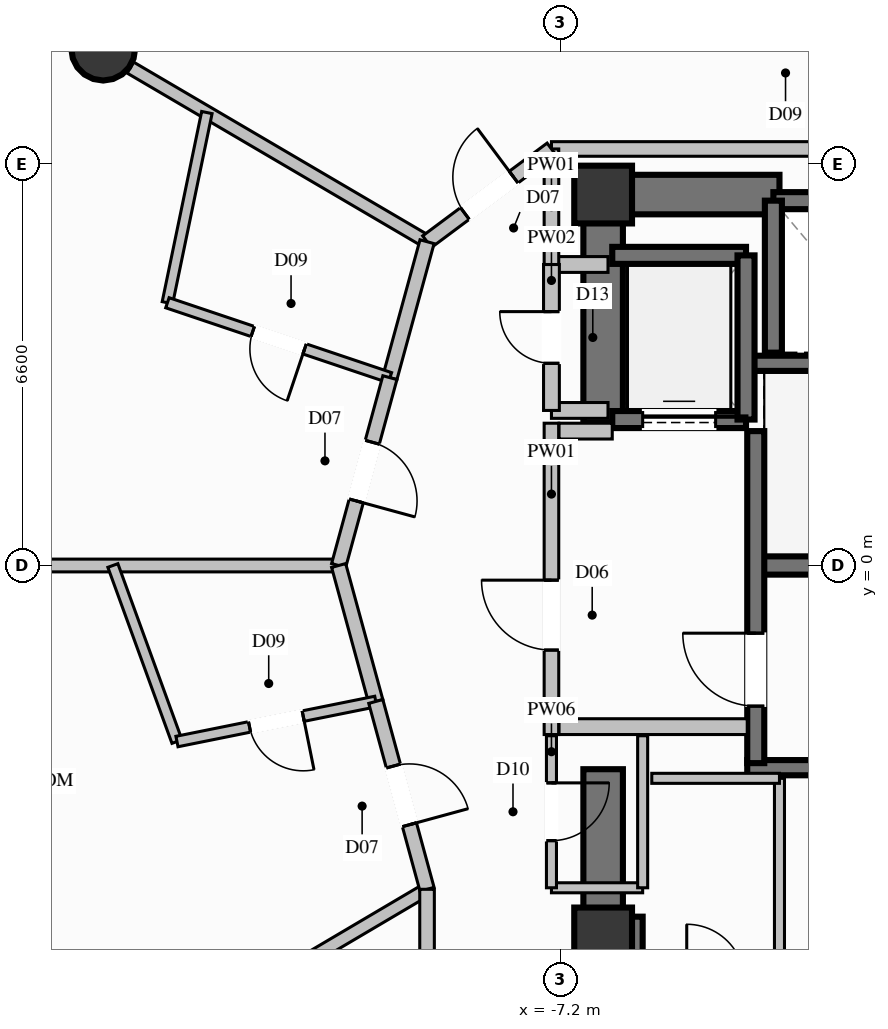
"""IFC4 building model, lengths in metres.
Left out: names, types, materials, properties, quantities, classifications, styles, units other than length and angle.
Written with IfcOpenShell. Run it as: python <this file> out.ifc"""

import sys

from ifc_helpers import new_model, si_unit, direction, frame, frame_2d, origin, origin_2d, place, context, subcontext, project, spatial, rectangle, circle, extrude, element, fill, save


model = new_model("IFC4")
c1 = context("Model", 3, precision=1e-05, world=origin(), true_north=direction((0.0, 1.0)))
c2 = subcontext(c1, "Body", "Model", "MODEL_VIEW")
j1 = project(units=[si_unit("LENGTHUNIT", "METRE"), si_unit("PLANEANGLEUNIT", "RADIAN")], contexts=[c1])
p1 = place(None, origin())
s1 = spatial("IfcSite", under=j1, at=p1, CompositionType="ELEMENT")
p2 = place(p1, origin())
s2 = spatial("IfcBuilding", under=s1, at=p2, CompositionType="ELEMENT")
p3 = place(p2, frame((0.0, 0.0, 106.2)))
s3 = spatial("IfcBuildingStorey", under=s2, at=p3, CompositionType="ELEMENT", Elevation=106.2)
for number, where, z_axis, x_axis in (
    (1, (-6.5, -6.1, 0.0), (0.0, 0.0, 1.0), (1.0, 0.0, 0.0)),
    (2, (-6.5, 6.1, 0.0), (0.0, 0.0, 1.0), (1.0, 0.0, 0.0)),
):
    element("IfcColumn", number, at=place(p3, frame(where, z_axis=z_axis, x_axis=x_axis)), inside=s3, PredefinedType="COLUMN", context=c2, shape_type="SweptSolid", body=[
        extrude(rectangle(XDim=0.95, YDim=0.95, at=origin_2d()), origin(), (0.0, 0.0, 1.0), 3.6),
    ])
p4 = place(p3, frame((-3.99, 0.0, 0.0), z_axis=(0.0, 0.0, 1.0), x_axis=(1.0, 0.0, 0.0)))
e3 = element("IfcWall", 3, at=p4, inside=s3, PredefinedType="SHEAR", context=c2, shape_type="SweptSolid", body=[
    extrude(rectangle(XDim=7.98, YDim=0.3, at=frame_2d((3.99, 0.0))), origin(), (0.0, 0.0, 1.0), 3.6),
])
for number, where, z_axis, x_axis in (
    (4, (-4.13, -3.325, 0.0), (0.0, 0.0, 1.0), (1.0, 0.0, 0.0)),
    (5, (-4.13, 3.325, 0.0), (0.0, 0.0, 1.0), (1.0, 0.0, 0.0)),
):
    element("IfcWall", number, at=place(p3, frame(where, z_axis=z_axis, x_axis=x_axis)), inside=s3, PredefinedType="SOLIDWALL", context=c2, shape_type="SweptSolid", body=[
        extrude(rectangle(XDim=8.26, YDim=0.25, at=frame_2d((4.13, 0.0))), origin(), (0.0, 0.0, 1.0), 3.6),
    ])
p5 = place(p3, frame((-6.175, -6.1, 0.0), z_axis=(0.0, 0.0, 1.0), x_axis=(1.0, 0.0, 0.0)))
e6 = element("IfcWall", 6, at=p5, inside=s3, PredefinedType="SHEAR", context=c2, shape_type="SweptSolid", body=[
    extrude(rectangle(XDim=0.325, YDim=0.65, at=frame_2d((0.163, 0.0))), origin(), (0.0, 0.0, 1.0), 3.6),
])
p6 = place(p3, frame((-6.175, 6.1, 0.0), z_axis=(0.0, 0.0, 1.0), x_axis=(1.0, 0.0, 0.0)))
e7 = element("IfcWall", 7, at=p6, inside=s3, PredefinedType="SHEAR", context=c2, shape_type="SweptSolid", body=[
    extrude(rectangle(XDim=2.575, YDim=0.65, at=frame_2d((1.288, 0.0))), origin(), (0.0, 0.0, 1.0), 3.6),
])
p7 = place(p3, frame((-6.5, 2.35, 0.0), z_axis=(0.0, 0.0, 1.0), x_axis=(0.0, 1.0, 0.0)))
e8 = element("IfcWall", 8, at=p7, inside=s3, PredefinedType="SHEAR", context=c2, shape_type="SweptSolid", body=[
    extrude(rectangle(XDim=4.075, YDim=0.65, at=frame_2d((2.038, 0.0))), origin(), (0.0, 0.0, 1.0), 3.6),
])
p8 = place(p3, frame((-6.5, -6.425, 0.0), z_axis=(0.0, 0.0, 1.0), x_axis=(0.0, 1.0, 0.0)))
e9 = element("IfcWall", 9, at=p8, inside=s3, PredefinedType="SHEAR", context=c2, shape_type="SweptSolid", body=[
    extrude(rectangle(XDim=3.075, YDim=0.65, at=frame_2d((1.538, 0.0))), origin(), (0.0, 0.0, 1.0), 3.6),
])
p9 = place(p3, frame((-14.722, 8.5, 0.0), z_axis=(0.0, 0.0, 1.0), x_axis=(1.0, 0.0, 0.0)))
e10 = element("IfcColumn", 10, at=p9, inside=s3, PredefinedType="COLUMN", context=c2, shape_type="SweptSolid", body=[
    extrude(circle(Radius=0.525, at=origin_2d()), origin(), (0.0, 0.0, 1.0), 3.6),
])
p10 = place(p3, frame((-1.6, 6.0, 0.0), z_axis=(0.0, 0.0, 1.0), x_axis=(-1.0, 0.0, 0.0)))
e11 = element("IfcWall", 11, at=p10, inside=s3, PredefinedType="SOLIDWALL", context=c2, shape_type="SweptSolid", body=[
    extrude(rectangle(XDim=2.1, YDim=0.28, at=frame_2d((1.05, 0.0))), origin(), (0.0, 0.0, 1.0), 3.35),
])
p11 = place(p3, frame((-3.7, 6.0, 0.0), z_axis=(0.0, 0.0, 1.0), x_axis=(0.0, -1.0, 0.0)))
e12 = element("IfcWall", 12, at=p11, inside=s3, PredefinedType="SOLIDWALL", context=c2, shape_type="SweptSolid", body=[
    extrude(rectangle(XDim=2.5, YDim=0.28, at=frame_2d((1.25, 0.0))), origin(), (0.0, 0.0, 1.0), 3.35),
])
p12 = place(p3, frame((-6.35, 2.4, 0.0), z_axis=(0.0, 0.0, 1.0), x_axis=(1.0, 0.0, 0.0)))
e13 = element("IfcWall", 13, at=p12, inside=s3, PredefinedType="SOLIDWALL", context=c2, shape_type="SweptSolid", body=[
    extrude(rectangle(XDim=2.2, YDim=0.28, at=frame_2d((1.1, 0.0))), origin(), (0.0, 0.0, 1.0), 3.35),
])
p13 = place(p12, frame((0.5, 0.0, 0.0)))
e14 = element("IfcOpeningElement", 14, at=p13, cuts=e13, PredefinedType="OPENING", context=c2, shape_type="SweptSolid", body=[
    extrude(rectangle(XDim=1.2, YDim=2.2, at=frame_2d((0.6, 1.1))), frame((0.0, 0.15, 0.0), z_axis=(0.0, -1.0, 0.0), x_axis=(1.0, 0.0, 0.0)), (0.0, 0.0, 1.0), 0.3),
])
p14 = place(p3, frame((-4.15, 5.1, 0.0), z_axis=(0.0, 0.0, 1.0), x_axis=(-1.0, 0.0, 0.0)))
e15 = element("IfcWall", 15, at=p14, inside=s3, PredefinedType="SOLIDWALL", context=c2, shape_type="SweptSolid", body=[
    extrude(rectangle(XDim=2.2, YDim=0.28, at=frame_2d((1.1, 0.0))), origin(), (0.0, 0.0, 1.0), 3.35),
])
p15 = place(p3, frame((-4.15, 2.4, 0.0), z_axis=(0.0, 0.0, 1.0), x_axis=(0.0, 1.0, 0.0)))
e16 = element("IfcWall", 16, at=p15, inside=s3, PredefinedType="SOLIDWALL", context=c2, shape_type="SweptSolid", body=[
    extrude(rectangle(XDim=2.7, YDim=0.28, at=frame_2d((1.35, 0.0))), origin(), (0.0, 0.0, 1.0), 3.35),
])
p16 = place(p3, frame((-3.99, -3.25, 0.0), z_axis=(0.0, 0.0, 1.0), x_axis=(0.0, 1.0, 0.0)))
e17 = element("IfcWall", 17, at=p16, inside=s3, PredefinedType="SOLIDWALL", context=c2, shape_type="SweptSolid", body=[
    extrude(rectangle(XDim=5.46, YDim=0.28, at=frame_2d((2.73, 0.0))), origin(), (0.0, 0.0, 1.0), 3.35),
])
p17 = place(p16, frame((0.937, 0.0, 0.0)))
e18 = element("IfcOpeningElement", 18, at=p17, cuts=e17, PredefinedType="OPENING", context=c2, shape_type="SweptSolid", body=[
    extrude(rectangle(XDim=1.2, YDim=2.2, at=frame_2d((0.6, 1.1))), frame((0.0, 0.15, 0.0), z_axis=(0.0, -1.0, 0.0), x_axis=(1.0, 0.0, 0.0)), (0.0, 0.0, 1.0), 0.3),
])
p18 = place(p3, frame((-7.35, -2.78, 0.0), z_axis=(0.0, 0.0, 1.0), x_axis=(0.0, 1.0, 0.0)))
e19 = element("IfcWall", 19, at=p18, inside=s3, PredefinedType="PARTITIONING", context=c2, shape_type="SweptSolid", body=[
    extrude(rectangle(XDim=5.12, YDim=0.24, at=frame_2d((2.56, 0.0))), origin(), (0.0, 0.0, 1.0), 2.435),
])
p19 = place(p18, frame((1.389, 0.0, 0.0)))
e20 = element("IfcOpeningElement", 20, at=p19, cuts=e19, PredefinedType="OPENING", context=c2, shape_type="SweptSolid", body=[
    extrude(rectangle(XDim=1.15, YDim=2.2, at=frame_2d((0.575, 1.1))), frame((0.0, 0.13, 0.0), z_axis=(0.0, -1.0, 0.0), x_axis=(1.0, 0.0, 0.0)), (0.0, 0.0, 1.0), 0.26),
])
p20 = place(p3, frame((-7.225, -2.65, 0.0), z_axis=(0.0, 0.0, 1.0), x_axis=(1.0, 0.0, 0.0)))
e21 = element("IfcWall", 21, at=p20, inside=s3, PredefinedType="PARTITIONING", context=c2, shape_type="SweptSolid", body=[
    extrude(rectangle(XDim=3.095, YDim=0.26, at=frame_2d((1.548, 0.0))), origin(), (0.0, 0.0, 1.0), 3.35),
])
p21 = place(p3, frame((-7.225, 2.21, 0.0), z_axis=(0.0, 0.0, 1.0), x_axis=(1.0, 0.0, 0.0)))
e22 = element("IfcWall", 22, at=p21, inside=s3, PredefinedType="PARTITIONING", context=c2, shape_type="SweptSolid", body=[
    extrude(rectangle(XDim=0.875, YDim=0.26, at=frame_2d((0.438, 0.0))), origin(), (0.0, 0.0, 1.0), 3.35),
])
for number, where, z_axis, x_axis in (
    (23, (-7.35, 4.95, 0.0), (0.0, 0.0, 1.0), (1.0, 0.0, 0.0)),
    (24, (-7.35, 2.55, 0.0), (0.0, 0.0, 1.0), (1.0, 0.0, 0.0)),
):
    element("IfcWall", number, at=place(p3, frame(where, z_axis=z_axis, x_axis=x_axis)), inside=s3, PredefinedType="PARTITIONING", context=c2, shape_type="SweptSolid", body=[
        extrude(rectangle(XDim=0.93, YDim=0.26, at=frame_2d((0.465, 0.0))), origin(), (0.0, 0.0, 1.0), 3.35),
    ])
p22 = place(p3, frame((-7.35, 2.55, 0.0), z_axis=(0.0, 0.0, 1.0), x_axis=(0.0, 1.0, 0.0)))
e25 = element("IfcWall", 25, at=p22, inside=s3, PredefinedType="PARTITIONING", context=c2, shape_type="SweptSolid", body=[
    extrude(rectangle(XDim=2.4, YDim=0.26, at=frame_2d((1.2, 0.0))), origin(), (0.0, 0.0, 1.0), 2.435),
])
p23 = place(p22, frame((0.775, 0.0, 0.0)))
e26 = element("IfcOpeningElement", 26, at=p23, cuts=e25, PredefinedType="OPENING", context=c2, shape_type="SweptSolid", body=[
    extrude(rectangle(XDim=0.85, YDim=2.05, at=frame_2d((0.425, 1.025))), frame((0.0, 0.14, 0.0), z_axis=(0.0, -1.0, 0.0), x_axis=(1.0, 0.0, 0.0)), (0.0, 0.0, 1.0), 0.28),
])
p24 = place(p3, frame((-7.35, 6.85, 0.0), z_axis=(0.0, 0.0, 1.0), x_axis=(1.0, 0.0, 0.0)))
e27 = element("IfcWall", 27, at=p24, inside=s3, PredefinedType="PARTITIONING", context=c2, shape_type="SweptSolid", body=[
    extrude(rectangle(XDim=14.7, YDim=0.24, at=frame_2d((7.35, 0.0))), origin(), (0.0, 0.0, 1.0), 2.435),
])
p25 = place(p3, frame((-7.35, 4.95, 0.0), z_axis=(0.0, 0.0, 1.0), x_axis=(0.0, 1.0, 0.0)))
e28 = element("IfcWall", 28, at=p25, inside=s3, PredefinedType="PARTITIONING", context=c2, shape_type="SweptSolid", body=[
    extrude(rectangle(XDim=1.9, YDim=0.24, at=frame_2d((0.95, 0.0))), origin(), (0.0, 0.0, 1.0), 2.435),
])
p26 = place(p3, frame((-7.35, -5.3, 0.0), z_axis=(0.0, 0.0, 1.0), x_axis=(1.0, 0.0, 0.0)))
e29 = element("IfcWall", 29, at=p26, inside=s3, PredefinedType="PARTITIONING", context=c2, shape_type="SweptSolid", body=[
    extrude(rectangle(XDim=1.5, YDim=0.165, at=frame_2d((0.75, 0.0))), origin(), (0.0, 0.0, 1.0), 2.435),
])
p27 = place(p3, frame((-5.85, -5.3, 0.0), z_axis=(0.0, 0.0, 1.0), x_axis=(0.0, 1.0, 0.0)))
e30 = element("IfcWall", 30, at=p27, inside=s3, PredefinedType="PARTITIONING", context=c2, shape_type="SweptSolid", body=[
    extrude(rectangle(XDim=2.5, YDim=0.165, at=frame_2d((1.25, 0.0))), origin(), (0.0, 0.0, 1.0), 2.435),
])
p28 = place(p3, frame((-7.35, -2.8, 0.0), z_axis=(0.0, 0.0, 1.0), x_axis=(0.0, -1.0, 0.0)))
e31 = element("IfcWall", 31, at=p28, inside=s3, PredefinedType="PARTITIONING", context=c2, shape_type="SweptSolid", body=[
    extrude(rectangle(XDim=2.5, YDim=0.165, at=frame_2d((1.25, 0.0))), origin(), (0.0, 0.0, 1.0), 3.35),
])
p29 = place(p28, frame((0.775, 0.0, 0.0)))
e32 = element("IfcOpeningElement", 32, at=p29, cuts=e31, PredefinedType="OPENING", context=c2, shape_type="SweptSolid", body=[
    extrude(rectangle(XDim=0.95, YDim=2.1, at=frame_2d((0.475, 1.05))), frame((0.0, 0.093, 0.0), z_axis=(0.0, -1.0, 0.0), x_axis=(1.0, 0.0, 0.0)), (0.0, 0.0, 1.0), 0.185),
])
p30 = place(p3, frame((-3.6, -6.85, 0.0), z_axis=(0.0, 0.0, 1.0), x_axis=(0.0, 1.0, 0.0)))
e33 = element("IfcWall", 33, at=p30, inside=s3, PredefinedType="PARTITIONING", context=c2, shape_type="SweptSolid", body=[
    extrude(rectangle(XDim=3.35, YDim=0.165, at=frame_2d((1.675, 0.0))), origin(), (0.0, 0.0, 1.0), 3.35),
])
p31 = place(p3, frame((-3.6, -3.5, 0.0), z_axis=(0.0, 0.0, 1.0), x_axis=(-1.0, 0.0, 0.0)))
e34 = element("IfcWall", 34, at=p31, inside=s3, PredefinedType="PARTITIONING", context=c2, shape_type="SweptSolid", body=[
    extrude(rectangle(XDim=2.1, YDim=0.165, at=frame_2d((1.05, 0.0))), origin(), (0.0, 0.0, 1.0), 3.35),
])
p32 = place(p3, frame((-9.396, 5.325, 0.0), z_axis=(0.0, 0.0, 1.0), x_axis=(-0.862467386777, 0.50611264235, 0.0)))
e35 = element("IfcWall", 35, at=p32, inside=s3, PredefinedType="PARTITIONING", context=c2, shape_type="SweptSolid", body=[
    extrude(rectangle(XDim=5.657, YDim=0.21, at=frame_2d((2.829, 0.0))), origin(), (0.0, 0.0, 1.0), 2.719),
])
p33 = place(p3, frame((-10.85, 0.0, 0.0), z_axis=(0.0, 0.0, 1.0), x_axis=(-1.0, 0.0, 0.0)))
e36 = element("IfcWall", 36, at=p33, inside=s3, PredefinedType="PARTITIONING", context=c2, shape_type="SweptSolid", body=[
    extrude(rectangle(XDim=5.605, YDim=0.21, at=frame_2d((2.802, 0.0))), origin(), (0.0, 0.0, 1.0), 3.35),
])
p34 = place(p3, frame((-9.396, -5.325, 0.0), z_axis=(0.0, 0.0, 1.0), x_axis=(-0.861187639937, -0.508287171607, 0.0)))
e37 = element("IfcWall", 37, at=p34, inside=s3, PredefinedType="PARTITIONING", context=c2, shape_type="SweptSolid", body=[
    extrude(rectangle(XDim=5.656, YDim=0.21, at=frame_2d((2.828, 0.0))), origin(), (0.0, 0.0, 1.0), 2.719),
])
p35 = place(p3, frame((-3.584, 9.865, 0.0), z_axis=(0.0, 0.0, 1.0), x_axis=(0.404626310395, -0.914482120621, 0.0)))
e38 = element("IfcWall", 38, at=p35, inside=s3, PredefinedType="PLUMBINGWALL", context=c2, shape_type="SweptSolid", body=[
    extrude(rectangle(XDim=3.297, YDim=0.175, at=frame_2d((1.648, 0.0))), origin(), (0.0, 0.0, 1.0), 3.35),
])
p36 = place(p35, frame((1.198, 0.0, 0.0)))
e39 = element("IfcOpeningElement", 39, at=p36, cuts=e38, PredefinedType="OPENING", context=c2, shape_type="SweptSolid", body=[
    extrude(rectangle(XDim=0.9, YDim=2.1, at=frame_2d((0.45, 1.05))), frame((0.0, 0.098, 0.0), z_axis=(0.0, -1.0, 0.0), x_axis=(1.0, 0.0, 0.0)), (0.0, 0.0, 1.0), 0.195),
])
p37 = place(p3, frame((-9.396, 5.325, 0.0), z_axis=(0.0, 0.0, 1.0), x_axis=(0.8017416961, 0.597670689205, 0.0)))
e40 = element("IfcWall", 40, at=p37, inside=s3, PredefinedType="PARTITIONING", context=c2, shape_type="SweptSolid", body=[
    extrude(rectangle(XDim=2.552, YDim=0.24, at=frame_2d((1.276, 0.0))), origin(), (0.0, 0.0, 1.0), 3.35),
])
p38 = place(p37, frame((0.776, 0.0, 0.0)))
e41 = element("IfcOpeningElement", 41, at=p38, cuts=e40, PredefinedType="OPENING", context=c2, shape_type="SweptSolid", body=[
    extrude(rectangle(XDim=1.0, YDim=2.2, at=frame_2d((0.5, 1.1))), frame((0.0, 0.13, 0.0), z_axis=(0.0, -1.0, 0.0), x_axis=(1.0, 0.0, 0.0)), (0.0, 0.0, 1.0), 0.26),
])
p39 = place(p3, frame((-9.396, 5.325, 0.0), z_axis=(0.0, 0.0, 1.0), x_axis=(-0.263643210908, -0.964620265878, 0.0)))
e42 = element("IfcWall", 42, at=p39, inside=s3, PredefinedType="PARTITIONING", context=c2, shape_type="SweptSolid", body=[
    extrude(rectangle(XDim=2.318, YDim=0.24, at=frame_2d((1.159, 0.0))), origin(), (0.0, 0.0, 1.0), 3.35),
])
p40 = place(p3, frame((-13.017, 7.449, 0.0), z_axis=(0.0, 0.0, 1.0), x_axis=(-0.203136275653, -0.979150475419, 0.0)))
e43 = element("IfcWall", 43, at=p40, inside=s3, PredefinedType="PLUMBINGWALL", context=c2, shape_type="SweptSolid", body=[
    extrude(rectangle(XDim=3.195, YDim=0.175, at=frame_2d((1.597, 0.0))), origin(), (0.0, 0.0, 1.0), 3.35),
])
p41 = place(p3, frame((-10.007, 3.089, 0.0), z_axis=(0.0, 0.0, 1.0), x_axis=(-0.947724103288, 0.319090933822, 0.0)))
e44 = element("IfcWall", 44, at=p41, inside=s3, PredefinedType="PLUMBINGWALL", context=c2, shape_type="SweptSolid", body=[
    extrude(rectangle(XDim=3.861, YDim=0.175, at=frame_2d((1.93, 0.0))), origin(), (0.0, 0.0, 1.0), 3.35),
])
p42 = place(p41, frame((1.48, 0.0, 0.0)))
e45 = element("IfcOpeningElement", 45, at=p42, cuts=e44, PredefinedType="OPENING", context=c2, shape_type="SweptSolid", body=[
    extrude(rectangle(XDim=0.9, YDim=2.1, at=frame_2d((0.45, 1.05))), frame((0.0, 0.098, 0.0), z_axis=(0.0, -1.0, 0.0), x_axis=(1.0, 0.0, 0.0)), (0.0, 0.0, 1.0), 0.195),
])
p43 = place(p3, frame((-10.007, 3.089, 0.0), z_axis=(0.0, 0.0, 1.0), x_axis=(-0.263272237376, -0.964721581093, 0.0)))
e46 = element("IfcWall", 46, at=p43, inside=s3, PredefinedType="PARTITIONING", context=c2, shape_type="SweptSolid", body=[
    extrude(rectangle(XDim=3.202, YDim=0.24, at=frame_2d((1.601, 0.0))), origin(), (0.0, 0.0, 1.0), 3.35),
])
p44 = place(p43, frame((1.101, 0.0, 0.0)))
e47 = element("IfcOpeningElement", 47, at=p44, cuts=e46, PredefinedType="OPENING", context=c2, shape_type="SweptSolid", body=[
    extrude(rectangle(XDim=1.0, YDim=2.2, at=frame_2d((0.5, 1.1))), frame((0.0, 0.13, 0.0), z_axis=(0.0, -1.0, 0.0), x_axis=(1.0, 0.0, 0.0)), (0.0, 0.0, 1.0), 0.26),
])
p45 = place(p3, frame((-10.85, 0.0, 0.0), z_axis=(0.0, 0.0, 1.0), x_axis=(0.263616426241, -0.964627586074, 0.0)))
e48 = element("IfcWall", 48, at=p45, inside=s3, PredefinedType="PARTITIONING", context=c2, shape_type="SweptSolid", body=[
    extrude(rectangle(XDim=2.318, YDim=0.24, at=frame_2d((1.159, 0.0))), origin(), (0.0, 0.0, 1.0), 3.35),
])
p46 = place(p3, frame((-14.563, 0.0, 0.0), z_axis=(0.0, 0.0, 1.0), x_axis=(0.342092982083, -0.939666106449, 0.0)))
e49 = element("IfcWall", 49, at=p46, inside=s3, PredefinedType="PLUMBINGWALL", context=c2, shape_type="SweptSolid", body=[
    extrude(rectangle(XDim=3.081, YDim=0.175, at=frame_2d((1.541, 0.0))), origin(), (0.0, 0.0, 1.0), 3.35),
])
p47 = place(p3, frame((-10.239, -2.236, 0.0), z_axis=(0.0, 0.0, 1.0), x_axis=(-0.980295333609, -0.197537487338, 0.0)))
e50 = element("IfcWall", 50, at=p47, inside=s3, PredefinedType="PLUMBINGWALL", context=c2, shape_type="SweptSolid", body=[
    extrude(rectangle(XDim=3.336, YDim=0.175, at=frame_2d((1.668, 0.0))), origin(), (0.0, 0.0, 1.0), 3.35),
])
p48 = place(p47, frame((1.218, 0.0, 0.0)))
e51 = element("IfcOpeningElement", 51, at=p48, cuts=e50, PredefinedType="OPENING", context=c2, shape_type="SweptSolid", body=[
    extrude(rectangle(XDim=0.9, YDim=2.1, at=frame_2d((0.45, 1.05))), frame((0.0, 0.098, 0.0), z_axis=(0.0, -1.0, 0.0), x_axis=(1.0, 0.0, 0.0)), (0.0, 0.0, 1.0), 0.195),
])
p49 = place(p3, frame((-10.239, -2.236, 0.0), z_axis=(0.0, 0.0, 1.0), x_axis=(0.26329160366, -0.964716295831, 0.0)))
e52 = element("IfcWall", 52, at=p49, inside=s3, PredefinedType="PARTITIONING", context=c2, shape_type="SweptSolid", body=[
    extrude(rectangle(XDim=3.202, YDim=0.24, at=frame_2d((1.601, 0.0))), origin(), (0.0, 0.0, 1.0), 3.35),
])
p50 = place(p49, frame((1.101, 0.0, 0.0)))
e53 = element("IfcOpeningElement", 53, at=p50, cuts=e52, PredefinedType="OPENING", context=c2, shape_type="SweptSolid", body=[
    extrude(rectangle(XDim=1.0, YDim=2.2, at=frame_2d((0.5, 1.1))), frame((0.0, 0.13, 0.0), z_axis=(0.0, -1.0, 0.0), x_axis=(1.0, 0.0, 0.0)), (0.0, 0.0, 1.0), 0.26),
])
p51 = place(p3, frame((-9.396, -5.325, 0.0), z_axis=(0.0, 0.0, 1.0), x_axis=(0.0, -1.0, 0.0)))
e54 = element("IfcWall", 54, at=p51, inside=s3, PredefinedType="PARTITIONING", context=c2, shape_type="SweptSolid", body=[
    extrude(rectangle(XDim=3.425, YDim=0.24, at=frame_2d((1.712, 0.0))), origin(), (0.0, 0.0, 1.0), 3.35),
])
p52 = place(p13, origin())
e55 = element("IfcDoor", 55, at=p52, inside=s3, OperationType="SLIDING_TO_LEFT", PredefinedType="DOOR", context=c2, shape_type="SweptSolid", body=[
    extrude(rectangle(XDim=1.2, YDim=2.2, at=frame_2d((0.6, 1.1))), frame((0.0, 0.025, 0.0), z_axis=(0.0, -1.0, 0.0), x_axis=(1.0, 0.0, 0.0)), (0.0, 0.0, 1.0), 0.05),
])
fill(e14, e55)
p53 = place(p17, origin())
e56 = element("IfcDoor", 56, at=p53, inside=s3, OperationType="SINGLE_SWING_RIGHT", PredefinedType="DOOR", context=c2, shape_type="SweptSolid", body=[
    extrude(rectangle(XDim=1.2, YDim=2.2, at=frame_2d((0.6, 1.1))), frame((0.0, 0.025, 0.0), z_axis=(0.0, -1.0, 0.0), x_axis=(1.0, 0.0, 0.0)), (0.0, 0.0, 1.0), 0.05),
])
fill(e18, e56)
p54 = place(p19, origin())
e57 = element("IfcDoor", 57, at=p54, inside=s3, OperationType="SINGLE_SWING_RIGHT", PredefinedType="DOOR", context=c2, shape_type="SweptSolid", body=[
    extrude(rectangle(XDim=1.15, YDim=2.2, at=frame_2d((0.575, 1.1))), frame((0.0, 0.025, 0.0), z_axis=(0.0, -1.0, 0.0), x_axis=(1.0, 0.0, 0.0)), (0.0, 0.0, 1.0), 0.05),
])
fill(e20, e57)
p55 = place(p23, origin())
e58 = element("IfcDoor", 58, at=p55, inside=s3, OperationType="SINGLE_SWING_RIGHT", PredefinedType="DOOR", context=c2, shape_type="SweptSolid", body=[
    extrude(rectangle(XDim=0.85, YDim=2.05, at=frame_2d((0.425, 1.025))), frame((0.0, 0.025, 0.0), z_axis=(0.0, -1.0, 0.0), x_axis=(1.0, 0.0, 0.0)), (0.0, 0.0, 1.0), 0.05),
])
fill(e26, e58)
p56 = place(p29, origin())
e59 = element("IfcDoor", 59, at=p56, inside=s3, OperationType="SINGLE_SWING_LEFT", PredefinedType="DOOR", context=c2, shape_type="SweptSolid", body=[
    extrude(rectangle(XDim=0.95, YDim=2.1, at=frame_2d((0.475, 1.05))), frame((0.0, 0.025, 0.0), z_axis=(0.0, -1.0, 0.0), x_axis=(1.0, 0.0, 0.0)), (0.0, 0.0, 1.0), 0.05),
])
fill(e32, e59)
p57 = place(p38, origin())
e60 = element("IfcDoor", 60, at=p57, inside=s3, OperationType="SINGLE_SWING_RIGHT", PredefinedType="DOOR", context=c2, shape_type="SweptSolid", body=[
    extrude(rectangle(XDim=1.0, YDim=2.2, at=frame_2d((0.5, 1.1))), frame((0.0, 0.025, 0.0), z_axis=(0.0, -1.0, 0.0), x_axis=(1.0, 0.0, 0.0)), (0.0, 0.0, 1.0), 0.05),
])
fill(e41, e60)
p58 = place(p42, origin())
e61 = element("IfcDoor", 61, at=p58, inside=s3, OperationType="SINGLE_SWING_LEFT", PredefinedType="DOOR", context=c2, shape_type="SweptSolid", body=[
    extrude(rectangle(XDim=0.9, YDim=2.1, at=frame_2d((0.45, 1.05))), frame((0.0, 0.025, 0.0), z_axis=(0.0, -1.0, 0.0), x_axis=(1.0, 0.0, 0.0)), (0.0, 0.0, 1.0), 0.05),
])
fill(e45, e61)
p59 = place(p44, origin())
e62 = element("IfcDoor", 62, at=p59, inside=s3, OperationType="SINGLE_SWING_RIGHT", PredefinedType="DOOR", context=c2, shape_type="SweptSolid", body=[
    extrude(rectangle(XDim=1.0, YDim=2.2, at=frame_2d((0.5, 1.1))), frame((0.0, 0.025, 0.0), z_axis=(0.0, -1.0, 0.0), x_axis=(1.0, 0.0, 0.0)), (0.0, 0.0, 1.0), 0.05),
])
fill(e47, e62)
p60 = place(p48, origin())
e63 = element("IfcDoor", 63, at=p60, inside=s3, OperationType="SINGLE_SWING_LEFT", PredefinedType="DOOR", context=c2, shape_type="SweptSolid", body=[
    extrude(rectangle(XDim=0.9, YDim=2.1, at=frame_2d((0.45, 1.05))), frame((0.0, 0.025, 0.0), z_axis=(0.0, -1.0, 0.0), x_axis=(1.0, 0.0, 0.0)), (0.0, 0.0, 1.0), 0.05),
])
fill(e51, e63)
p61 = place(p50, origin())
e64 = element("IfcDoor", 64, at=p61, inside=s3, OperationType="SINGLE_SWING_RIGHT", PredefinedType="DOOR", context=c2, shape_type="SweptSolid", body=[
    extrude(rectangle(XDim=1.0, YDim=2.2, at=frame_2d((0.5, 1.1))), frame((0.0, 0.025, 0.0), z_axis=(0.0, -1.0, 0.0), x_axis=(1.0, 0.0, 0.0)), (0.0, 0.0, 1.0), 0.05),
])
fill(e53, e64)
save(model, sys.argv[1])
